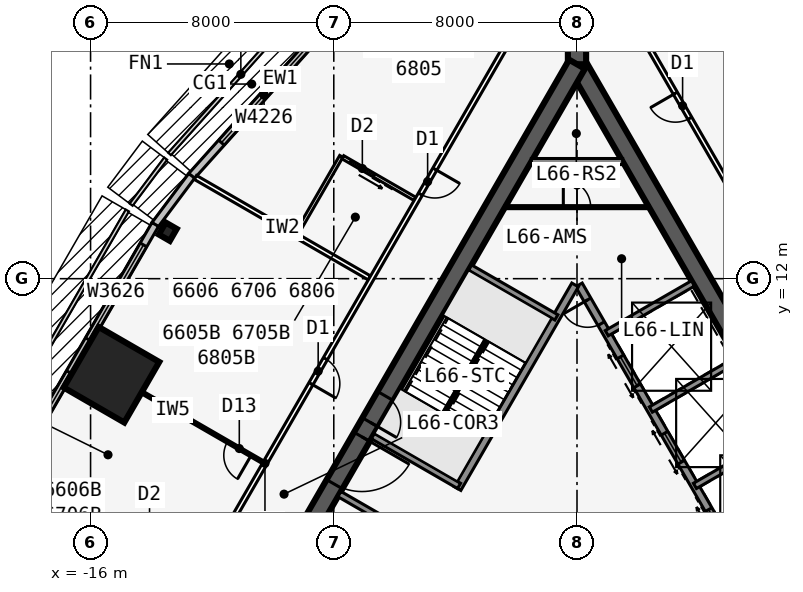
"""IFC4 building model, lengths in metres.
Left out: names, types, materials, properties, quantities, classifications, styles, units other than length and angle.
Written with IfcOpenShell. Run it as: python <this file> out.ifc"""

import sys

from ifc_helpers import new_model, si_unit, direction, frame, frame_2d, origin, origin_2d, place, context, subcontext, project, spatial, rectangle, i_section, extrude, element, fill, save


model = new_model("IFC4")
c1 = context("Model", 3, precision=1e-05, world=origin(), true_north=direction((0.0, 1.0)))
c2 = subcontext(c1, "Body", "Model", "MODEL_VIEW")
j1 = project(units=[si_unit("LENGTHUNIT", "METRE"), si_unit("PLANEANGLEUNIT", "RADIAN")], contexts=[c1])
p1 = place(None, origin())
s1 = spatial("IfcSite", under=j1, at=p1, CompositionType="ELEMENT")
p2 = place(p1, origin())
s2 = spatial("IfcBuilding", under=s1, at=p2, CompositionType="ELEMENT")
p3 = place(p2, frame((0.0, 0.0, 250.1)))
s3 = spatial("IfcBuildingStorey", under=s2, at=p3, CompositionType="ELEMENT", Elevation=250.1)
p4 = place(p3, frame((16.5, -9.526, 0.0), z_axis=(0.0, 0.0, 1.0), x_axis=(-0.499999749417, 0.866025548458, 0.0)))
e1 = element("IfcWall", 1, at=p4, inside=s3, PredefinedType="SHEAR", context=c2, shape_type="SweptSolid", body=[
    extrude(rectangle(XDim=33.0, YDim=0.6, at=frame_2d((16.5, 0.0))), origin(), (0.0, 0.0, 1.0), 3.6),
])
p5 = place(p4, frame((14.15, 0.0, 0.0)))
e2 = element("IfcOpeningElement", 2, at=p5, cuts=e1, PredefinedType="OPENING", context=c2, shape_type="SweptSolid", body=[
    extrude(rectangle(XDim=1.8, YDim=2.13, at=frame_2d((0.9, 1.065))), frame((0.0, 0.31, 0.0), z_axis=(0.0, -1.0, 0.0), x_axis=(1.0, 0.0, 0.0)), (0.0, 0.0, 1.0), 0.62),
])
p6 = place(p4, frame((12.6, 0.0, 0.0)))
e3 = element("IfcOpeningElement", 3, at=p6, cuts=e1, PredefinedType="OPENING", context=c2, shape_type="SweptSolid", body=[
    extrude(rectangle(XDim=1.0, YDim=2.13, at=frame_2d((0.5, 1.065))), frame((0.0, 0.31, 0.0), z_axis=(0.0, -1.0, 0.0), x_axis=(1.0, 0.0, 0.0)), (0.0, 0.0, 1.0), 0.62),
])
p7 = place(p3, frame((5.379, 2.586, 0.0), z_axis=(0.0, 0.0, 1.0), x_axis=(-0.500001375892, 0.866024609411, 0.0)))
e4 = element("IfcWall", 4, at=p7, inside=s3, PredefinedType="SOLIDWALL", context=c2, shape_type="SweptSolid", body=[
    extrude(rectangle(XDim=10.633, YDim=0.25, at=frame_2d((5.316, 0.0))), origin(), (0.0, 0.0, 1.0), 3.435),
])
p8 = place(p7, frame((9.164, 0.0, 0.0)))
e5 = element("IfcOpeningElement", 5, at=p8, cuts=e4, PredefinedType="OPENING", context=c2, shape_type="SweptSolid", body=[
    extrude(rectangle(XDim=0.9, YDim=2.13, at=frame_2d((0.45, 1.065))), frame((0.0, 0.135, 0.0), z_axis=(0.0, -1.0, 0.0), x_axis=(1.0, 0.0, 0.0)), (0.0, 0.0, 1.0), 0.27),
])
p9 = place(p7, frame((1.0, 0.0, 0.0)))
e6 = element("IfcOpeningElement", 6, at=p9, cuts=e4, PredefinedType="OPENING", context=c2, shape_type="SweptSolid", body=[
    extrude(rectangle(XDim=1.1, YDim=2.13, at=frame_2d((0.55, 1.065))), frame((0.0, 0.135, 0.0), z_axis=(0.0, -1.0, 0.0), x_axis=(1.0, 0.0, 0.0)), (0.0, 0.0, 1.0), 0.27),
])
p10 = place(p7, frame((3.9, 0.0, 0.0)))
e7 = element("IfcOpeningElement", 7, at=p10, cuts=e4, PredefinedType="OPENING", context=c2, shape_type="SweptSolid", body=[
    extrude(rectangle(XDim=1.1, YDim=2.13, at=frame_2d((0.55, 1.065))), frame((0.0, 0.135, 0.0), z_axis=(0.0, -1.0, 0.0), x_axis=(1.0, 0.0, 0.0)), (0.0, 0.0, 1.0), 0.27),
])
p11 = place(p7, frame((6.8, 0.0, 0.0)))
e8 = element("IfcOpeningElement", 8, at=p11, cuts=e4, PredefinedType="OPENING", context=c2, shape_type="SweptSolid", body=[
    extrude(rectangle(XDim=1.1, YDim=2.13, at=frame_2d((0.55, 1.065))), frame((0.0, 0.135, 0.0), z_axis=(0.0, -1.0, 0.0), x_axis=(1.0, 0.0, 0.0)), (0.0, 0.0, 1.0), 0.27),
])
for number, where, z_axis, x_axis in (
    (9, (3.879, 5.184, 0.0), (0.0, 0.0, 1.0), (0.866, 0.5, 0.0)),
    (10, (2.429, 7.696, 0.0), (0.0, 0.0, 1.0), (0.866, 0.5, 0.0)),
    (11, (0.979, 10.207, 0.0), (0.0, 0.0, 1.0), (0.866, 0.5, 0.0)),
):
    element("IfcWall", number, at=place(p3, frame(where, z_axis=z_axis, x_axis=x_axis)), inside=s3, PredefinedType="SOLIDWALL", context=c2, shape_type="SweptSolid", body=[
        extrude(rectangle(XDim=3.275, YDim=0.2, at=frame_2d((1.637, 0.0))), origin(), (0.0, 0.0, 1.0), 3.435),
    ])
p12 = place(p3, frame((0.0, 19.052, 0.0), z_axis=(0.0, 0.0, 1.0), x_axis=(-0.499999749417, -0.866025548458, 0.0)))
e12 = element("IfcWall", 12, at=p12, inside=s3, PredefinedType="SHEAR", context=c2, shape_type="SweptSolid", body=[
    extrude(rectangle(XDim=33.0, YDim=0.6, at=frame_2d((16.5, 0.0))), origin(), (0.0, 0.0, 1.0), 3.6),
])
p13 = place(p12, frame((14.15, 0.0, 0.0)))
e13 = element("IfcOpeningElement", 13, at=p13, cuts=e12, PredefinedType="OPENING", context=c2, shape_type="SweptSolid", body=[
    extrude(rectangle(XDim=1.8, YDim=2.13, at=frame_2d((0.9, 1.065))), frame((0.0, 0.31, 0.0), z_axis=(0.0, -1.0, 0.0), x_axis=(1.0, 0.0, 0.0)), (0.0, 0.0, 1.0), 0.62),
])
p14 = place(p12, frame((12.6, 0.0, 0.0)))
e14 = element("IfcOpeningElement", 14, at=p14, cuts=e12, PredefinedType="OPENING", context=c2, shape_type="SweptSolid", body=[
    extrude(rectangle(XDim=1.0, YDim=2.13, at=frame_2d((0.5, 1.065))), frame((0.0, 0.31, 0.0), z_axis=(0.0, -1.0, 0.0), x_axis=(1.0, 0.0, 0.0)), (0.0, 0.0, 1.0), 0.62),
])
p15 = place(p3, frame((-0.062, 11.794, 0.0), z_axis=(0.0, 0.0, 1.0), x_axis=(-0.500006680225, -0.86602154692, 0.0)))
e15 = element("IfcWall", 15, at=p15, inside=s3, PredefinedType="SOLIDWALL", context=c2, shape_type="SweptSolid", body=[
    extrude(rectangle(XDim=7.733, YDim=0.25, at=frame_2d((3.866, 0.0))), origin(), (0.0, 0.0, 1.0), 3.435),
])
for number, where, z_axis, x_axis in (
    (16, (-0.679, 10.727, 0.0), (0.0, 0.0, 1.0), (-0.866, 0.5, 0.0)),
    (17, (-3.879, 5.184, 0.0), (0.0, 0.0, 1.0), (-0.866, 0.5, 0.0)),
    (18, (-4.979, 3.279, 0.0), (0.0, 0.0, 1.0), (-0.866, 0.5, 0.0)),
):
    element("IfcWall", number, at=place(p3, frame(where, z_axis=z_axis, x_axis=x_axis)), inside=s3, PredefinedType="SOLIDWALL", context=c2, shape_type="SweptSolid", body=[
        extrude(rectangle(XDim=3.275, YDim=0.2, at=frame_2d((1.637, 0.0))), origin(), (0.0, 0.0, 1.0), 3.435),
    ])
p16 = place(p3, frame((0.0, 19.052, 0.0), z_axis=(0.0, 0.0, 1.0), x_axis=(0.0, 1.0, 0.0)))
e19 = element("IfcWall", 19, at=p16, inside=s3, PredefinedType="SHEAR", context=c2, shape_type="SweptSolid", body=[
    extrude(rectangle(XDim=4.746, YDim=0.6, at=frame_2d((2.373, 0.0))), origin(), (0.0, 0.0, 1.0), 3.6),
])
p17 = place(p16, frame((1.65, 0.0, 0.0)))
e20 = element("IfcOpeningElement", 20, at=p17, cuts=e19, PredefinedType="OPENING", context=c2, shape_type="SweptSolid", body=[
    extrude(rectangle(XDim=1.8, YDim=2.13, at=frame_2d((0.9, 1.065))), frame((0.0, 0.31, 0.0), z_axis=(0.0, -1.0, 0.0), x_axis=(1.0, 0.0, 0.0)), (0.0, 0.0, 1.0), 0.62),
])
p18 = place(p3, frame((-13.461, 13.545, 0.0), z_axis=(0.0, 0.0, 1.0), x_axis=(-0.866025403784, 0.5, 0.0)))
e21 = element("IfcColumn", 21, at=p18, inside=s3, PredefinedType="COLUMN", context=c2, shape_type="SweptSolid", body=[
    extrude(i_section(OverallWidth=0.419, OverallDepth=0.455, WebThickness=0.042, FlangeThickness=0.068, at=origin_2d()), origin(), (0.0, 0.0, 1.0), 3.6),
])
p19 = place(p3, frame((-15.312, 8.84, 0.0), z_axis=(0.0, 0.0, 1.0), x_axis=(-0.866025403784, 0.5, 0.0)))
e22 = element("IfcColumn", 22, at=p19, inside=s3, PredefinedType="COLUMN", context=c2, shape_type="SweptSolid", body=[
    extrude(rectangle(XDim=2.3, YDim=2.3, at=origin_2d()), origin(), (0.0, 0.0, 1.0), 3.6),
])
p20 = place(p3, frame((-7.907, 20.701, 0.0), z_axis=(0.0, 0.0, 1.0), x_axis=(-0.667303550892, -0.744785855778, 0.0)))
e23 = element("IfcWall", 23, at=p20, inside=s3, PredefinedType="STANDARD", context=c2, shape_type="SweptSolid", body=[
    extrude(rectangle(XDim=7.153, YDim=0.25, at=frame_2d((3.576, 0.0))), origin(), (0.0, 0.0, 1.0), 3.435),
])
p21 = place(p20, frame((1.476, 0.0, 0.45)))
e24 = element("IfcOpeningElement", 24, at=p21, cuts=e23, PredefinedType="OPENING", context=c2, shape_type="SweptSolid", body=[
    extrude(rectangle(XDim=4.2, YDim=2.6, at=frame_2d((2.1, 1.3))), frame((0.0, 0.135, 0.0), z_axis=(0.0, -1.0, 0.0), x_axis=(1.0, 0.0, 0.0)), (0.0, 0.0, 1.0), 0.27),
])
p22 = place(p3, frame((-12.673, 15.382, 0.0), z_axis=(0.0, 0.0, 1.0), x_axis=(-0.599650843534, -0.800261748335, 0.0)))
e25 = element("IfcWall", 25, at=p22, inside=s3, PredefinedType="STANDARD", context=c2, shape_type="SweptSolid", body=[
    extrude(rectangle(XDim=2.014, YDim=0.25, at=frame_2d((1.007, 0.0))), origin(), (0.0, 0.0, 1.0), 3.435),
])
p23 = place(p3, frame((-13.873, 13.783, 0.0), z_axis=(0.0, 0.0, 1.0), x_axis=(-0.499993662806, -0.866029062534, 0.0)))
e26 = element("IfcWall", 26, at=p23, inside=s3, PredefinedType="STANDARD", context=c2, shape_type="SweptSolid", body=[
    extrude(rectangle(XDim=10.0, YDim=0.25, at=frame_2d((5.0, 0.0))), origin(), (0.0, 0.0, 1.0), 3.435),
])
p24 = place(p23, frame((0.775, 0.0, 0.45)))
e27 = element("IfcOpeningElement", 27, at=p24, cuts=e26, PredefinedType="OPENING", context=c2, shape_type="SweptSolid", body=[
    extrude(rectangle(XDim=3.6, YDim=2.6, at=frame_2d((1.8, 1.3))), frame((0.0, 0.135, 0.0), z_axis=(0.0, -1.0, 0.0), x_axis=(1.0, 0.0, 0.0)), (0.0, 0.0, 1.0), 0.27),
])
p25 = place(p23, frame((5.625, 0.0, 0.45)))
e28 = element("IfcOpeningElement", 28, at=p25, cuts=e26, PredefinedType="OPENING", context=c2, shape_type="SweptSolid", body=[
    extrude(rectangle(XDim=3.6, YDim=2.6, at=frame_2d((1.8, 1.3))), frame((0.0, 0.135, 0.0), z_axis=(0.0, -1.0, 0.0), x_axis=(1.0, 0.0, 0.0)), (0.0, 0.0, 1.0), 0.27),
])
p26 = place(p3, frame((20.177, -11.245, 0.0), z_axis=(0.0, 0.0, 1.0), x_axis=(-0.499998875317, 0.866026053119, 0.0)))
e29 = element("IfcWall", 29, at=p26, inside=s3, PredefinedType="PARTITIONING", context=c2, shape_type="SweptSolid", body=[
    extrude(rectangle(XDim=39.654, YDim=0.15, at=frame_2d((19.827, 0.0))), origin(), (0.0, 0.0, 1.0), 3.435),
])
p27 = place(p26, frame((5.772, 0.0, 0.0)))
e30 = element("IfcOpeningElement", 30, at=p27, cuts=e29, PredefinedType="OPENING", context=c2, shape_type="SweptSolid", body=[
    extrude(rectangle(XDim=0.95, YDim=2.13, at=frame_2d((0.475, 1.065))), frame((0.0, 0.085, 0.0), z_axis=(0.0, -1.0, 0.0), x_axis=(1.0, 0.0, 0.0)), (0.0, 0.0, 1.0), 0.17),
])
p28 = place(p26, frame((32.932, 0.0, 0.0)))
e31 = element("IfcOpeningElement", 31, at=p28, cuts=e29, PredefinedType="OPENING", context=c2, shape_type="SweptSolid", body=[
    extrude(rectangle(XDim=0.95, YDim=2.13, at=frame_2d((0.475, 1.065))), frame((0.0, 0.085, 0.0), z_axis=(0.0, -1.0, 0.0), x_axis=(1.0, 0.0, 0.0)), (0.0, 0.0, 1.0), 0.17),
])
p29 = place(p3, frame((-0.35, 23.096, 0.0), z_axis=(0.0, 0.0, 1.0), x_axis=(-0.499998875317, -0.866026053119, 0.0)))
e32 = element("IfcWall", 32, at=p29, inside=s3, PredefinedType="PARTITIONING", context=c2, shape_type="SweptSolid", body=[
    extrude(rectangle(XDim=39.654, YDim=0.15, at=frame_2d((19.827, 0.0))), origin(), (0.0, 0.0, 1.0), 3.435),
])
p30 = place(p29, frame((8.652, 0.0, 0.0)))
e33 = element("IfcOpeningElement", 33, at=p30, cuts=e32, PredefinedType="OPENING", context=c2, shape_type="SweptSolid", body=[
    extrude(rectangle(XDim=0.95, YDim=2.13, at=frame_2d((0.475, 1.065))), frame((0.0, 0.085, 0.0), z_axis=(0.0, -1.0, 0.0), x_axis=(1.0, 0.0, 0.0)), (0.0, 0.0, 1.0), 0.17),
])
p31 = place(p29, frame((15.852, 0.0, 0.0)))
e34 = element("IfcOpeningElement", 34, at=p31, cuts=e32, PredefinedType="OPENING", context=c2, shape_type="SweptSolid", body=[
    extrude(rectangle(XDim=0.95, YDim=2.13, at=frame_2d((0.475, 1.065))), frame((0.0, 0.085, 0.0), z_axis=(0.0, -1.0, 0.0), x_axis=(1.0, 0.0, 0.0)), (0.0, 0.0, 1.0), 0.17),
])
p32 = place(p29, frame((30.052, 0.0, 0.0)))
e35 = element("IfcOpeningElement", 35, at=p32, cuts=e32, PredefinedType="OPENING", context=c2, shape_type="SweptSolid", body=[
    extrude(rectangle(XDim=0.95, YDim=2.13, at=frame_2d((0.475, 1.065))), frame((0.0, 0.085, 0.0), z_axis=(0.0, -1.0, 0.0), x_axis=(1.0, 0.0, 0.0)), (0.0, 0.0, 1.0), 0.17),
])
p33 = place(p3, frame((-6.829, 12.025, 0.0), z_axis=(0.0, 0.0, 1.0), x_axis=(-0.866029323189, 0.499993211332, 0.0)))
e36 = element("IfcWall", 36, at=p33, inside=s3, PredefinedType="PARTITIONING", context=c2, shape_type="SweptSolid", body=[
    extrude(rectangle(XDim=6.608, YDim=0.15, at=frame_2d((3.304, 0.0))), origin(), (0.0, 0.0, 1.0), 2.678),
])
p34 = place(p3, frame((-10.329, 5.963, 0.0), z_axis=(0.0, 0.0, 1.0), x_axis=(-0.866011785882, 0.500023586156, 0.0)))
e37 = element("IfcWall", 37, at=p34, inside=s3, PredefinedType="PARTITIONING", context=c2, shape_type="SweptSolid", body=[
    extrude(rectangle(XDim=6.854, YDim=0.1, at=frame_2d((3.427, 0.0))), origin(), (0.0, 0.0, 1.0), 2.678),
])
p35 = place(p34, frame((0.45, 0.0, 0.0)))
e38 = element("IfcOpeningElement", 38, at=p35, cuts=e37, PredefinedType="OPENING", context=c2, shape_type="SweptSolid", body=[
    extrude(rectangle(XDim=0.9, YDim=2.13, at=frame_2d((0.45, 1.065))), frame((0.0, 0.06, 0.0), z_axis=(0.0, -1.0, 0.0), x_axis=(1.0, 0.0, 0.0)), (0.0, 0.0, 1.0), 0.12),
])
p36 = place(p3, frame((-7.753, 16.023, 0.0), z_axis=(0.0, 0.0, 1.0), x_axis=(-0.499990139034, -0.866031096941, 0.0)))
e39 = element("IfcWall", 39, at=p36, inside=s3, PredefinedType="PLUMBINGWALL", context=c2, shape_type="SweptSolid", body=[
    extrude(rectangle(XDim=3.0, YDim=0.12, at=frame_2d((1.5, 0.0))), origin(), (0.0, 0.0, 1.0), 3.435),
])
p37 = place(p3, frame((-5.329, 14.623, 0.0), z_axis=(0.0, 0.0, 1.0), x_axis=(-0.865997131366, 0.500048966069, 0.0)))
e40 = element("IfcWall", 40, at=p37, inside=s3, PredefinedType="PLUMBINGWALL", context=c2, shape_type="SweptSolid", body=[
    extrude(rectangle(XDim=2.74, YDim=0.12, at=frame_2d((1.37, 0.0))), origin(), (0.0, 0.0, 1.0), 3.435),
])
p38 = place(p37, frame((1.55, 0.0, 0.0)))
e41 = element("IfcOpeningElement", 41, at=p38, cuts=e40, PredefinedType="OPENING", context=c2, shape_type="SweptSolid", body=[
    extrude(rectangle(XDim=0.9, YDim=2.13, at=frame_2d((0.45, 1.065))), frame((0.0, 0.07, 0.0), z_axis=(0.0, -1.0, 0.0), x_axis=(1.0, 0.0, 0.0)), (0.0, 0.0, 1.0), 0.14),
])
p39 = place(p3, frame((-1.501, 15.853, 0.0), z_axis=(0.0, 0.0, 1.0), x_axis=(1.0, 0.0, 0.0)))
e42 = element("IfcWall", 42, at=p39, inside=s3, PredefinedType="SOLIDWALL", context=c2, shape_type="SweptSolid", body=[
    extrude(rectangle(XDim=3.002, YDim=0.2, at=frame_2d((1.501, 0.0))), origin(), (0.0, 0.0, 1.0), 3.435),
])
p40 = place(p3, frame((-2.367, 14.353, 0.0), z_axis=(0.0, 0.0, 1.0), x_axis=(1.0, 0.0, 0.0)))
e43 = element("IfcWall", 43, at=p40, inside=s3, PredefinedType="PARTITIONING", context=c2, shape_type="SweptSolid", body=[
    extrude(rectangle(XDim=4.734, YDim=0.1, at=frame_2d((2.367, 0.0))), origin(), (0.0, 0.0, 1.0), 3.435),
])
p41 = place(p40, frame((1.917, 0.0, 0.0)))
e44 = element("IfcOpeningElement", 44, at=p41, cuts=e43, PredefinedType="OPENING", context=c2, shape_type="SweptSolid", body=[
    extrude(rectangle(XDim=0.9, YDim=2.13, at=frame_2d((0.45, 1.065))), frame((0.0, 0.06, 0.0), z_axis=(0.0, -1.0, 0.0), x_axis=(1.0, 0.0, 0.0)), (0.0, 0.0, 1.0), 0.12),
])
p42 = place(p3, frame((-2.988, 9.978, 0.0), z_axis=(0.0, 0.0, 1.0), x_axis=(-0.499992232847, -0.866029888106, 0.0)))
e45 = element("IfcWall", 45, at=p42, inside=s3, PredefinedType="SOLIDWALL", context=c2, shape_type="SweptSolid", body=[
    extrude(rectangle(XDim=2.794, YDim=0.1, at=frame_2d((1.397, 0.0))), origin(), (0.0, 0.0, 1.0), 3.6),
])
p43 = place(p21, origin())
e46 = element("IfcWindow", 46, at=p43, inside=s3, PartitioningType="SINGLE_PANEL", PredefinedType="WINDOW", context=c2, shape_type="SweptSolid", body=[
    extrude(rectangle(XDim=4.2, YDim=2.6, at=frame_2d((2.1, 1.3))), frame((0.0, 0.03, 0.0), z_axis=(0.0, -1.0, 0.0), x_axis=(1.0, 0.0, 0.0)), (0.0, 0.0, 1.0), 0.06),
])
fill(e24, e46)
p44 = place(p24, origin())
e47 = element("IfcWindow", 47, at=p44, inside=s3, PartitioningType="SINGLE_PANEL", PredefinedType="WINDOW", context=c2, shape_type="SweptSolid", body=[
    extrude(rectangle(XDim=3.6, YDim=2.6, at=frame_2d((1.8, 1.3))), frame((0.0, 0.03, 0.0), z_axis=(0.0, -1.0, 0.0), x_axis=(1.0, 0.0, 0.0)), (0.0, 0.0, 1.0), 0.06),
])
fill(e27, e47)
p45 = place(p25, origin())
e48 = element("IfcWindow", 48, at=p45, inside=s3, PartitioningType="SINGLE_PANEL", PredefinedType="WINDOW", context=c2, shape_type="SweptSolid", body=[
    extrude(rectangle(XDim=3.6, YDim=2.6, at=frame_2d((1.8, 1.3))), frame((0.0, 0.03, 0.0), z_axis=(0.0, -1.0, 0.0), x_axis=(1.0, 0.0, 0.0)), (0.0, 0.0, 1.0), 0.06),
])
fill(e28, e48)
p46 = place(p28, origin())
e49 = element("IfcDoor", 49, at=p46, inside=s3, OperationType="SINGLE_SWING_RIGHT", PredefinedType="DOOR", context=c2, shape_type="SweptSolid", body=[
    extrude(rectangle(XDim=0.95, YDim=2.13, at=frame_2d((0.475, 1.065))), frame((0.0, 0.025, 0.0), z_axis=(0.0, -1.0, 0.0), x_axis=(1.0, 0.0, 0.0)), (0.0, 0.0, 1.0), 0.05),
])
fill(e31, e49)
p47 = place(p35, origin())
e50 = element("IfcDoor", 50, at=p47, inside=s3, OperationType="SINGLE_SWING_LEFT", PredefinedType="DOOR", context=c2, shape_type="SweptSolid", body=[
    extrude(rectangle(XDim=0.9, YDim=2.13, at=frame_2d((0.45, 1.065))), frame((0.0, 0.025, 0.0), z_axis=(0.0, -1.0, 0.0), x_axis=(1.0, 0.0, 0.0)), (0.0, 0.0, 1.0), 0.05),
])
fill(e38, e50)
p48 = place(p38, origin())
e51 = element("IfcDoor", 51, at=p48, inside=s3, OperationType="SLIDING_TO_LEFT", PredefinedType="DOOR", context=c2, shape_type="SweptSolid", body=[
    extrude(rectangle(XDim=0.9, YDim=2.13, at=frame_2d((0.45, 1.065))), frame((0.0, 0.025, 0.0), z_axis=(0.0, -1.0, 0.0), x_axis=(1.0, 0.0, 0.0)), (0.0, 0.0, 1.0), 0.05),
])
fill(e41, e51)
p49 = place(p30, origin())
e52 = element("IfcDoor", 52, at=p49, inside=s3, OperationType="SINGLE_SWING_LEFT", PredefinedType="DOOR", context=c2, shape_type="SweptSolid", body=[
    extrude(rectangle(XDim=0.95, YDim=2.13, at=frame_2d((0.475, 1.065))), frame((0.0, 0.025, 0.0), z_axis=(0.0, -1.0, 0.0), x_axis=(1.0, 0.0, 0.0)), (0.0, 0.0, 1.0), 0.05),
])
fill(e33, e52)
p50 = place(p31, origin())
e53 = element("IfcDoor", 53, at=p50, inside=s3, OperationType="SINGLE_SWING_RIGHT", PredefinedType="DOOR", context=c2, shape_type="SweptSolid", body=[
    extrude(rectangle(XDim=0.95, YDim=2.13, at=frame_2d((0.475, 1.065))), frame((0.0, 0.025, 0.0), z_axis=(0.0, -1.0, 0.0), x_axis=(1.0, 0.0, 0.0)), (0.0, 0.0, 1.0), 0.05),
])
fill(e34, e53)
p51 = place(p13, origin())
e54 = element("IfcDoor", 54, at=p51, inside=s3, OperationType="DOUBLE_DOOR_SINGLE_SWING", PredefinedType="DOOR", context=c2, shape_type="SweptSolid", body=[
    extrude(rectangle(XDim=1.8, YDim=2.13, at=frame_2d((0.9, 1.065))), frame((0.0, 0.025, 0.0), z_axis=(0.0, -1.0, 0.0), x_axis=(1.0, 0.0, 0.0)), (0.0, 0.0, 1.0), 0.05),
])
fill(e13, e54)
p52 = place(p14, origin())
e55 = element("IfcDoor", 55, at=p52, inside=s3, OperationType="SINGLE_SWING_RIGHT", PredefinedType="DOOR", context=c2, shape_type="SweptSolid", body=[
    extrude(rectangle(XDim=1.0, YDim=2.13, at=frame_2d((0.5, 1.065))), frame((0.0, 0.025, 0.0), z_axis=(0.0, -1.0, 0.0), x_axis=(1.0, 0.0, 0.0)), (0.0, 0.0, 1.0), 0.05),
])
fill(e14, e55)
p53 = place(p41, origin())
e56 = element("IfcDoor", 56, at=p53, inside=s3, OperationType="SINGLE_SWING_LEFT", PredefinedType="DOOR", context=c2, shape_type="SweptSolid", body=[
    extrude(rectangle(XDim=0.9, YDim=2.13, at=frame_2d((0.45, 1.065))), frame((0.0, 0.025, 0.0), z_axis=(0.0, -1.0, 0.0), x_axis=(1.0, 0.0, 0.0)), (0.0, 0.0, 1.0), 0.05),
])
fill(e44, e56)
p54 = place(p8, origin())
e57 = element("IfcDoor", 57, at=p54, inside=s3, OperationType="SINGLE_SWING_RIGHT", PredefinedType="DOOR", context=c2, shape_type="SweptSolid", body=[
    extrude(rectangle(XDim=0.9, YDim=2.13, at=frame_2d((0.45, 1.065))), frame((0.0, 0.025, 0.0), z_axis=(0.0, -1.0, 0.0), x_axis=(1.0, 0.0, 0.0)), (0.0, 0.0, 1.0), 0.05),
])
fill(e5, e57)
p55 = place(p9, origin())
e58 = element("IfcDoor", 58, at=p55, inside=s3, OperationType="DOUBLE_DOOR_SLIDING", PredefinedType="USERDEFINED", context=c2, shape_type="SweptSolid", body=[
    extrude(rectangle(XDim=1.1, YDim=2.13, at=frame_2d((0.55, 1.065))), frame((0.0, 0.025, 0.0), z_axis=(0.0, -1.0, 0.0), x_axis=(1.0, 0.0, 0.0)), (0.0, 0.0, 1.0), 0.05),
])
fill(e6, e58)
p56 = place(p10, origin())
e59 = element("IfcDoor", 59, at=p56, inside=s3, OperationType="DOUBLE_DOOR_SLIDING", PredefinedType="USERDEFINED", context=c2, shape_type="SweptSolid", body=[
    extrude(rectangle(XDim=1.1, YDim=2.13, at=frame_2d((0.55, 1.065))), frame((0.0, 0.025, 0.0), z_axis=(0.0, -1.0, 0.0), x_axis=(1.0, 0.0, 0.0)), (0.0, 0.0, 1.0), 0.05),
])
fill(e7, e59)
p57 = place(p11, origin())
e60 = element("IfcDoor", 60, at=p57, inside=s3, OperationType="DOUBLE_DOOR_SLIDING", PredefinedType="USERDEFINED", context=c2, shape_type="SweptSolid", body=[
    extrude(rectangle(XDim=1.1, YDim=2.13, at=frame_2d((0.55, 1.065))), frame((0.0, 0.025, 0.0), z_axis=(0.0, -1.0, 0.0), x_axis=(1.0, 0.0, 0.0)), (0.0, 0.0, 1.0), 0.05),
])
fill(e8, e60)
save(model, sys.argv[1])
